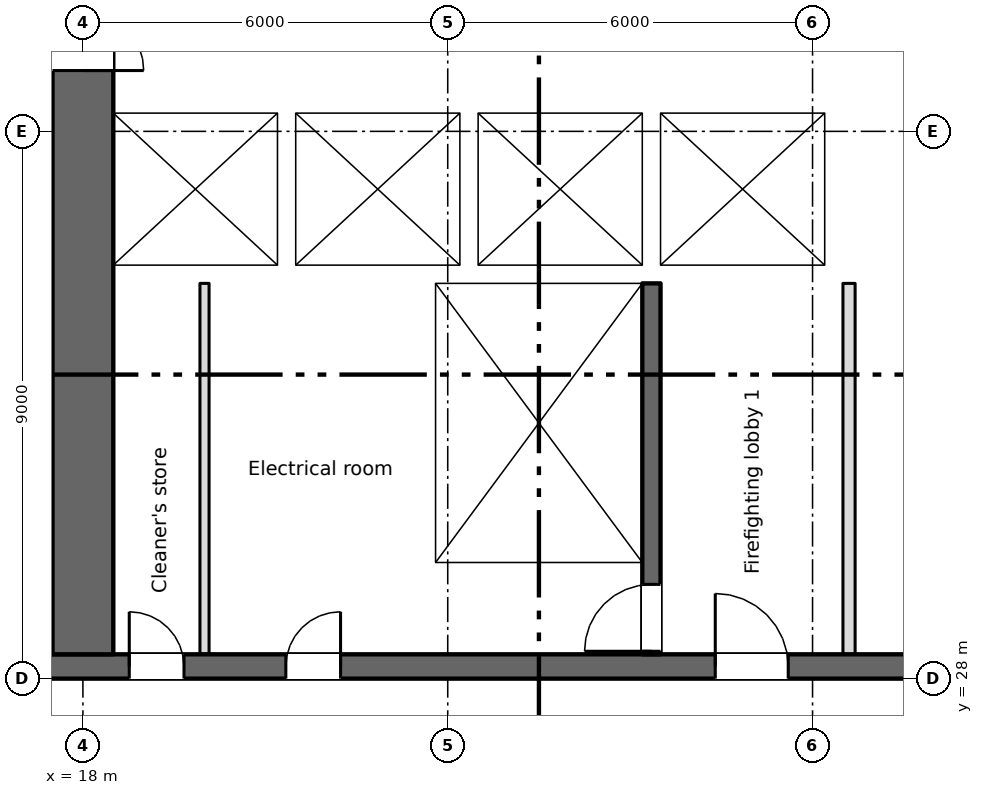
"""IFC4 building model, lengths in metres.
Left out: names, types, materials, properties, quantities, classifications, styles, units other than length and angle.
Written with IfcOpenShell. Run it as: python <this file> out.ifc"""

import sys

from ifc_helpers import new_model, si_unit, direction, frame, frame_2d, origin, place, context, subcontext, project, spatial, rectangle, extrude, element, fill, save


model = new_model("IFC4")
c1 = context("Model", 3, precision=1e-05, world=origin(), true_north=direction((0.0, 1.0)))
c2 = subcontext(c1, "Body", "Model", "MODEL_VIEW")
j1 = project(units=[si_unit("LENGTHUNIT", "METRE"), si_unit("PLANEANGLEUNIT", "RADIAN")], contexts=[c1])
p1 = place(None, origin())
s1 = spatial("IfcSite", under=j1, at=p1, CompositionType="ELEMENT")
p2 = place(p1, origin())
s2 = spatial("IfcBuilding", under=s1, at=p2, CompositionType="ELEMENT")
p3 = place(p2, frame((0.0, 0.0, 30.0)))
s3 = spatial("IfcBuildingStorey", under=s2, at=p3, CompositionType="ELEMENT", Elevation=30.0)
p4 = place(p3, frame((6.7, 28.2, 0.0), z_axis=(0.0, 0.0, 1.0), x_axis=(1.0, 0.0, 0.0)))
e1 = element("IfcWall", 1, at=p4, inside=s3, PredefinedType="SHEAR", context=c2, shape_type="SweptSolid", body=[
    extrude(rectangle(XDim=57.8, YDim=0.4, at=frame_2d((28.9, 0.0))), origin(), (0.0, 0.0, 1.0), 3.35),
])
p5 = place(p4, frame((12.062, 0.0, 0.0)))
e2 = element("IfcOpeningElement", 2, at=p5, cuts=e1, PredefinedType="OPENING", context=c2, shape_type="SweptSolid", body=[
    extrude(rectangle(XDim=0.9, YDim=2.1, at=frame_2d((0.45, 1.05))), frame((0.0, 0.21, 0.0), z_axis=(0.0, -1.0, 0.0), x_axis=(1.0, 0.0, 0.0)), (0.0, 0.0, 1.0), 0.42),
])
p6 = place(p4, frame((14.637, 0.0, 0.0)))
e3 = element("IfcOpeningElement", 3, at=p6, cuts=e1, PredefinedType="OPENING", context=c2, shape_type="SweptSolid", body=[
    extrude(rectangle(XDim=0.9, YDim=2.1, at=frame_2d((0.45, 1.05))), frame((0.0, 0.21, 0.0), z_axis=(0.0, -1.0, 0.0), x_axis=(1.0, 0.0, 0.0)), (0.0, 0.0, 1.0), 0.42),
])
p7 = place(p4, frame((49.062, 0.0, 0.0)))
e4 = element("IfcOpeningElement", 4, at=p7, cuts=e1, PredefinedType="OPENING", context=c2, shape_type="SweptSolid", body=[
    extrude(rectangle(XDim=0.9, YDim=2.1, at=frame_2d((0.45, 1.05))), frame((0.0, 0.21, 0.0), z_axis=(0.0, -1.0, 0.0), x_axis=(1.0, 0.0, 0.0)), (0.0, 0.0, 1.0), 0.42),
])
p8 = place(p4, frame((51.637, 0.0, 0.0)))
e5 = element("IfcOpeningElement", 5, at=p8, cuts=e1, PredefinedType="OPENING", context=c2, shape_type="SweptSolid", body=[
    extrude(rectangle(XDim=0.9, YDim=2.1, at=frame_2d((0.45, 1.05))), frame((0.0, 0.21, 0.0), z_axis=(0.0, -1.0, 0.0), x_axis=(1.0, 0.0, 0.0)), (0.0, 0.0, 1.0), 0.42),
])
p9 = place(p4, frame((1.35, 0.0, 0.0)))
e6 = element("IfcOpeningElement", 6, at=p9, cuts=e1, PredefinedType="OPENING", context=c2, shape_type="SweptSolid", body=[
    extrude(rectangle(XDim=0.9, YDim=2.1, at=frame_2d((0.45, 1.05))), frame((0.0, 0.21, 0.0), z_axis=(0.0, -1.0, 0.0), x_axis=(1.0, 0.0, 0.0)), (0.0, 0.0, 1.0), 0.42),
])
p10 = place(p4, frame((4.7, 0.0, 0.0)))
e7 = element("IfcOpeningElement", 7, at=p10, cuts=e1, PredefinedType="OPENING", context=c2, shape_type="SweptSolid", body=[
    extrude(rectangle(XDim=1.2, YDim=2.1, at=frame_2d((0.6, 1.05))), frame((0.0, 0.21, 0.0), z_axis=(0.0, -1.0, 0.0), x_axis=(1.0, 0.0, 0.0)), (0.0, 0.0, 1.0), 0.42),
])
p11 = place(p4, frame((31.7, 0.0, 0.0)))
e8 = element("IfcOpeningElement", 8, at=p11, cuts=e1, PredefinedType="OPENING", context=c2, shape_type="SweptSolid", body=[
    extrude(rectangle(XDim=1.2, YDim=2.1, at=frame_2d((0.6, 1.05))), frame((0.0, 0.21, 0.0), z_axis=(0.0, -1.0, 0.0), x_axis=(1.0, 0.0, 0.0)), (0.0, 0.0, 1.0), 0.42),
])
p12 = place(p4, frame((55.2, 0.0, 0.0)))
e9 = element("IfcOpeningElement", 9, at=p12, cuts=e1, PredefinedType="OPENING", context=c2, shape_type="SweptSolid", body=[
    extrude(rectangle(XDim=1.2, YDim=2.1, at=frame_2d((0.6, 1.05))), frame((0.0, 0.21, 0.0), z_axis=(0.0, -1.0, 0.0), x_axis=(1.0, 0.0, 0.0)), (0.0, 0.0, 1.0), 0.42),
])
p13 = place(p4, frame((21.7, 0.0, 0.0)))
e10 = element("IfcOpeningElement", 10, at=p13, cuts=e1, PredefinedType="OPENING", context=c2, shape_type="SweptSolid", body=[
    extrude(rectangle(XDim=1.2, YDim=2.1, at=frame_2d((0.6, 1.05))), frame((0.0, 0.21, 0.0), z_axis=(0.0, -1.0, 0.0), x_axis=(1.0, 0.0, 0.0)), (0.0, 0.0, 1.0), 0.42),
])
p14 = place(p4, frame((41.7, 0.0, 0.0)))
e11 = element("IfcOpeningElement", 11, at=p14, cuts=e1, PredefinedType="OPENING", context=c2, shape_type="SweptSolid", body=[
    extrude(rectangle(XDim=1.2, YDim=2.1, at=frame_2d((0.6, 1.05))), frame((0.0, 0.21, 0.0), z_axis=(0.0, -1.0, 0.0), x_axis=(1.0, 0.0, 0.0)), (0.0, 0.0, 1.0), 0.42),
])
p15 = place(p4, frame((24.85, 0.0, 0.0)))
e12 = element("IfcOpeningElement", 12, at=p15, cuts=e1, PredefinedType="OPENING", context=c2, shape_type="SweptSolid", body=[
    extrude(rectangle(XDim=2.4, YDim=2.1, at=frame_2d((1.2, 1.05))), frame((0.0, 0.21, 0.0), z_axis=(0.0, -1.0, 0.0), x_axis=(1.0, 0.0, 0.0)), (0.0, 0.0, 1.0), 0.42),
])
p16 = place(p4, frame((37.35, 0.0, 0.0)))
e13 = element("IfcOpeningElement", 13, at=p16, cuts=e1, PredefinedType="OPENING", context=c2, shape_type="SweptSolid", body=[
    extrude(rectangle(XDim=2.4, YDim=2.1, at=frame_2d((1.2, 1.05))), frame((0.0, 0.21, 0.0), z_axis=(0.0, -1.0, 0.0), x_axis=(1.0, 0.0, 0.0)), (0.0, 0.0, 1.0), 0.42),
])
p17 = place(p4, frame((7.85, 0.0, 0.0)))
e14 = element("IfcOpeningElement", 14, at=p17, cuts=e1, PredefinedType="OPENING", context=c2, shape_type="SweptSolid", body=[
    extrude(rectangle(XDim=2.4, YDim=2.1, at=frame_2d((1.2, 1.05))), frame((0.0, 0.21, 0.0), z_axis=(0.0, -1.0, 0.0), x_axis=(1.0, 0.0, 0.0)), (0.0, 0.0, 1.0), 0.42),
])
p18 = place(p4, frame((28.85, 0.0, 0.0)))
e15 = element("IfcOpeningElement", 15, at=p18, cuts=e1, PredefinedType="OPENING", context=c2, shape_type="SweptSolid", body=[
    extrude(rectangle(XDim=0.9, YDim=2.1, at=frame_2d((0.45, 1.05))), frame((0.0, 0.21, 0.0), z_axis=(0.0, -1.0, 0.0), x_axis=(1.0, 0.0, 0.0)), (0.0, 0.0, 1.0), 0.42),
])
p19 = place(p4, frame((34.85, 0.0, 0.0)))
e16 = element("IfcOpeningElement", 16, at=p19, cuts=e1, PredefinedType="OPENING", context=c2, shape_type="SweptSolid", body=[
    extrude(rectangle(XDim=0.9, YDim=2.1, at=frame_2d((0.45, 1.05))), frame((0.0, 0.21, 0.0), z_axis=(0.0, -1.0, 0.0), x_axis=(1.0, 0.0, 0.0)), (0.0, 0.0, 1.0), 0.42),
])
p20 = place(p3, frame((18.0, 28.4, 0.0), z_axis=(0.0, 0.0, 1.0), x_axis=(0.0, 1.0, 0.0)))
e17 = element("IfcWall", 17, at=p20, inside=s3, PredefinedType="SHEAR", context=c2, shape_type="SweptSolid", body=[
    extrude(rectangle(XDim=16.6, YDim=1.0, at=frame_2d((8.3, 0.0))), origin(), (0.0, 0.0, 1.0), 3.35),
])
p21 = place(p20, frame((9.6, 0.0, 0.0)))
e18 = element("IfcOpeningElement", 18, at=p21, cuts=e17, PredefinedType="OPENING", context=c2, shape_type="SweptSolid", body=[
    extrude(rectangle(XDim=2.0, YDim=2.1, at=frame_2d((1.0, 1.05))), frame((0.0, 0.51, 0.0), z_axis=(0.0, -1.0, 0.0), x_axis=(1.0, 0.0, 0.0)), (0.0, 0.0, 1.0), 1.02),
])
p22 = place(p20, frame((15.25, 0.0, 0.0)))
e19 = element("IfcOpeningElement", 19, at=p22, cuts=e17, PredefinedType="OPENING", context=c2, shape_type="SweptSolid", body=[
    extrude(rectangle(XDim=1.2, YDim=2.1, at=frame_2d((0.6, 1.05))), frame((0.0, 0.51, 0.0), z_axis=(0.0, -1.0, 0.0), x_axis=(1.0, 0.0, 0.0)), (0.0, 0.0, 1.0), 1.02),
])
p23 = place(p3, frame((23.65, 28.4, 0.0), z_axis=(0.0, 0.0, 1.0), x_axis=(0.0, 1.0, 0.0)))
e20 = element("IfcWall", 20, at=p23, inside=s3, PredefinedType="SHEAR", context=c2, shape_type="SweptSolid", body=[
    extrude(rectangle(XDim=6.1, YDim=0.3, at=frame_2d((3.05, 0.0))), origin(), (0.0, 0.0, 1.0), 3.35),
])
p24 = place(p3, frame((27.35, 28.4, 0.0), z_axis=(0.0, 0.0, 1.0), x_axis=(0.0, 1.0, 0.0)))
e21 = element("IfcWall", 21, at=p24, inside=s3, PredefinedType="SHEAR", context=c2, shape_type="SweptSolid", body=[
    extrude(rectangle(XDim=6.1, YDim=0.3, at=frame_2d((3.05, 0.0))), origin(), (0.0, 0.0, 1.0), 3.35),
])
p25 = place(p24, frame((0.05, 0.0, 0.0)))
e22 = element("IfcOpeningElement", 22, at=p25, cuts=e21, PredefinedType="OPENING", context=c2, shape_type="SweptSolid", body=[
    extrude(rectangle(XDim=1.1, YDim=2.1, at=frame_2d((0.55, 1.05))), frame((0.0, 0.16, 0.0), z_axis=(0.0, -1.0, 0.0), x_axis=(1.0, 0.0, 0.0)), (0.0, 0.0, 1.0), 0.32),
])
p26 = place(p3, frame((18.5, 34.65, 0.0), z_axis=(0.0, 0.0, 1.0), x_axis=(1.0, 0.0, 0.0)))
e23 = element("IfcWall", 23, at=p26, inside=s3, PredefinedType="SHEAR", context=c2, shape_type="SweptSolid", body=[
    extrude(rectangle(XDim=12.2, YDim=0.3, at=frame_2d((6.1, 0.0))), origin(), (0.0, 0.0, 1.0), 3.35),
])
p27 = place(p26, frame((9.8, 0.0, 0.0)))
e24 = element("IfcOpeningElement", 24, at=p27, cuts=e23, PredefinedType="OPENING", context=c2, shape_type="SweptSolid", body=[
    extrude(rectangle(XDim=1.1, YDim=2.1, at=frame_2d((0.55, 1.05))), frame((0.0, 0.16, 0.0), z_axis=(0.0, -1.0, 0.0), x_axis=(1.0, 0.0, 0.0)), (0.0, 0.0, 1.0), 0.32),
])
p28 = place(p3, frame((18.5, 37.45, 0.0), z_axis=(0.0, 0.0, 1.0), x_axis=(1.0, 0.0, 0.0)))
e25 = element("IfcWall", 25, at=p28, inside=s3, PredefinedType="SHEAR", context=c2, shape_type="SweptSolid", body=[
    extrude(rectangle(XDim=12.2, YDim=0.3, at=frame_2d((6.1, 0.0))), origin(), (0.0, 0.0, 1.0), 3.35),
])
p29 = place(p28, frame((0.8, 0.0, 0.0)))
e26 = element("IfcOpeningElement", 26, at=p29, cuts=e25, PredefinedType="OPENING", context=c2, shape_type="SweptSolid", body=[
    extrude(rectangle(XDim=1.1, YDim=2.1, at=frame_2d((0.55, 1.05))), frame((0.0, 0.16, 0.0), z_axis=(0.0, -1.0, 0.0), x_axis=(1.0, 0.0, 0.0)), (0.0, 0.0, 1.0), 0.32),
])
p30 = place(p28, frame((3.8, 0.0, 0.0)))
e27 = element("IfcOpeningElement", 27, at=p30, cuts=e25, PredefinedType="OPENING", context=c2, shape_type="SweptSolid", body=[
    extrude(rectangle(XDim=1.1, YDim=2.1, at=frame_2d((0.55, 1.05))), frame((0.0, 0.16, 0.0), z_axis=(0.0, -1.0, 0.0), x_axis=(1.0, 0.0, 0.0)), (0.0, 0.0, 1.0), 0.32),
])
p31 = place(p28, frame((6.8, 0.0, 0.0)))
e28 = element("IfcOpeningElement", 28, at=p31, cuts=e25, PredefinedType="OPENING", context=c2, shape_type="SweptSolid", body=[
    extrude(rectangle(XDim=1.1, YDim=2.1, at=frame_2d((0.55, 1.05))), frame((0.0, 0.16, 0.0), z_axis=(0.0, -1.0, 0.0), x_axis=(1.0, 0.0, 0.0)), (0.0, 0.0, 1.0), 0.32),
])
p32 = place(p3, frame((27.35, 34.8, 0.0), z_axis=(0.0, 0.0, 1.0), x_axis=(0.0, 1.0, 0.0)))
e29 = element("IfcWall", 29, at=p32, inside=s3, PredefinedType="SHEAR", context=c2, shape_type="SweptSolid", body=[
    extrude(rectangle(XDim=2.5, YDim=0.3, at=frame_2d((1.25, 0.0))), origin(), (0.0, 0.0, 1.0), 3.35),
])
p33 = place(p3, frame((30.45, 34.8, 0.0), z_axis=(0.0, 0.0, 1.0), x_axis=(0.0, 1.0, 0.0)))
e30 = element("IfcWall", 30, at=p33, inside=s3, PredefinedType="SHEAR", context=c2, shape_type="SweptSolid", body=[
    extrude(rectangle(XDim=2.5, YDim=0.5, at=frame_2d((1.25, 0.0))), origin(), (0.0, 0.0, 1.0), 3.35),
])
for number, where, z_axis, x_axis in (
    (31, (21.35, 34.8, 0.0), (0.0, 0.0, 1.0), (0.0, 1.0, 0.0)),
    (32, (24.35, 34.8, 0.0), (0.0, 0.0, 1.0), (0.0, 1.0, 0.0)),
):
    element("IfcWall", number, at=place(p3, frame(where, z_axis=z_axis, x_axis=x_axis)), inside=s3, PredefinedType="SHEAR", context=c2, shape_type="SweptSolid", body=[
        extrude(rectangle(XDim=2.5, YDim=0.3, at=frame_2d((1.25, 0.0))), origin(), (0.0, 0.0, 1.0), 3.35),
    ])
p34 = place(p3, frame((30.6, 28.4, 0.0), z_axis=(0.0, 0.0, 1.0), x_axis=(0.0, 1.0, 0.0)))
e33 = element("IfcWall", 33, at=p34, inside=s3, PredefinedType="PARTITIONING", context=c2, shape_type="SweptSolid", body=[
    extrude(rectangle(XDim=6.1, YDim=0.2, at=frame_2d((3.05, 0.0))), origin(), (0.0, 0.0, 1.0), 3.35),
])
p35 = place(p3, frame((20.0, 28.4, 0.0), z_axis=(0.0, 0.0, 1.0), x_axis=(0.0, 1.0, 0.0)))
e34 = element("IfcWall", 34, at=p35, inside=s3, PredefinedType="PARTITIONING", context=c2, shape_type="SweptSolid", body=[
    extrude(rectangle(XDim=6.1, YDim=0.15, at=frame_2d((3.05, 0.0))), origin(), (0.0, 0.0, 1.0), 3.35),
])
p36 = place(p5, origin())
e35 = element("IfcDoor", 35, at=p36, inside=s3, OperationType="SINGLE_SWING_LEFT", PredefinedType="DOOR", context=c2, shape_type="SweptSolid", body=[
    extrude(rectangle(XDim=0.9, YDim=2.1, at=frame_2d((0.45, 1.05))), frame((0.0, 0.025, 0.0), z_axis=(0.0, -1.0, 0.0), x_axis=(1.0, 0.0, 0.0)), (0.0, 0.0, 1.0), 0.05),
])
fill(e2, e35)
p37 = place(p6, origin())
e36 = element("IfcDoor", 36, at=p37, inside=s3, OperationType="SINGLE_SWING_RIGHT", PredefinedType="DOOR", context=c2, shape_type="SweptSolid", body=[
    extrude(rectangle(XDim=0.9, YDim=2.1, at=frame_2d((0.45, 1.05))), frame((0.0, 0.025, 0.0), z_axis=(0.0, -1.0, 0.0), x_axis=(1.0, 0.0, 0.0)), (0.0, 0.0, 1.0), 0.05),
])
fill(e3, e36)
p38 = place(p29, origin())
e37 = element("IfcDoor", 37, at=p38, inside=s3, OperationType="SLIDING_TO_LEFT", PredefinedType="DOOR", context=c2, shape_type="SweptSolid", body=[
    extrude(rectangle(XDim=1.1, YDim=2.1, at=frame_2d((0.55, 1.05))), frame((0.0, 0.025, 0.0), z_axis=(0.0, -1.0, 0.0), x_axis=(1.0, 0.0, 0.0)), (0.0, 0.0, 1.0), 0.05),
])
fill(e26, e37)
p39 = place(p30, origin())
e38 = element("IfcDoor", 38, at=p39, inside=s3, OperationType="SLIDING_TO_LEFT", PredefinedType="DOOR", context=c2, shape_type="SweptSolid", body=[
    extrude(rectangle(XDim=1.1, YDim=2.1, at=frame_2d((0.55, 1.05))), frame((0.0, 0.025, 0.0), z_axis=(0.0, -1.0, 0.0), x_axis=(1.0, 0.0, 0.0)), (0.0, 0.0, 1.0), 0.05),
])
fill(e27, e38)
p40 = place(p31, origin())
e39 = element("IfcDoor", 39, at=p40, inside=s3, OperationType="SLIDING_TO_LEFT", PredefinedType="DOOR", context=c2, shape_type="SweptSolid", body=[
    extrude(rectangle(XDim=1.1, YDim=2.1, at=frame_2d((0.55, 1.05))), frame((0.0, 0.025, 0.0), z_axis=(0.0, -1.0, 0.0), x_axis=(1.0, 0.0, 0.0)), (0.0, 0.0, 1.0), 0.05),
])
fill(e28, e39)
p41 = place(p27, origin())
e40 = element("IfcDoor", 40, at=p41, inside=s3, OperationType="SLIDING_TO_LEFT", PredefinedType="DOOR", context=c2, shape_type="SweptSolid", body=[
    extrude(rectangle(XDim=1.1, YDim=2.1, at=frame_2d((0.55, 1.05))), frame((0.0, 0.025, 0.0), z_axis=(0.0, -1.0, 0.0), x_axis=(1.0, 0.0, 0.0)), (0.0, 0.0, 1.0), 0.05),
])
fill(e24, e40)
p42 = place(p25, origin())
e41 = element("IfcDoor", 41, at=p42, inside=s3, OperationType="SINGLE_SWING_LEFT", PredefinedType="DOOR", context=c2, shape_type="SweptSolid", body=[
    extrude(rectangle(XDim=1.1, YDim=2.1, at=frame_2d((0.55, 1.05))), frame((0.0, 0.025, 0.0), z_axis=(0.0, -1.0, 0.0), x_axis=(1.0, 0.0, 0.0)), (0.0, 0.0, 1.0), 0.05),
])
fill(e22, e41)
p43 = place(p13, origin())
e42 = element("IfcDoor", 42, at=p43, inside=s3, OperationType="SINGLE_SWING_LEFT", PredefinedType="DOOR", context=c2, shape_type="SweptSolid", body=[
    extrude(rectangle(XDim=1.2, YDim=2.1, at=frame_2d((0.6, 1.05))), frame((0.0, 0.025, 0.0), z_axis=(0.0, -1.0, 0.0), x_axis=(1.0, 0.0, 0.0)), (0.0, 0.0, 1.0), 0.05),
])
fill(e10, e42)
p44 = place(p21, origin())
e43 = element("IfcDoor", 43, at=p44, inside=s3, OperationType="DOUBLE_DOOR_SINGLE_SWING", PredefinedType="DOOR", context=c2, shape_type="SweptSolid", body=[
    extrude(rectangle(XDim=2.0, YDim=2.1, at=frame_2d((1.0, 1.05))), frame((0.0, 0.025, 0.0), z_axis=(0.0, -1.0, 0.0), x_axis=(1.0, 0.0, 0.0)), (0.0, 0.0, 1.0), 0.05),
])
fill(e18, e43)
save(model, sys.argv[1])
